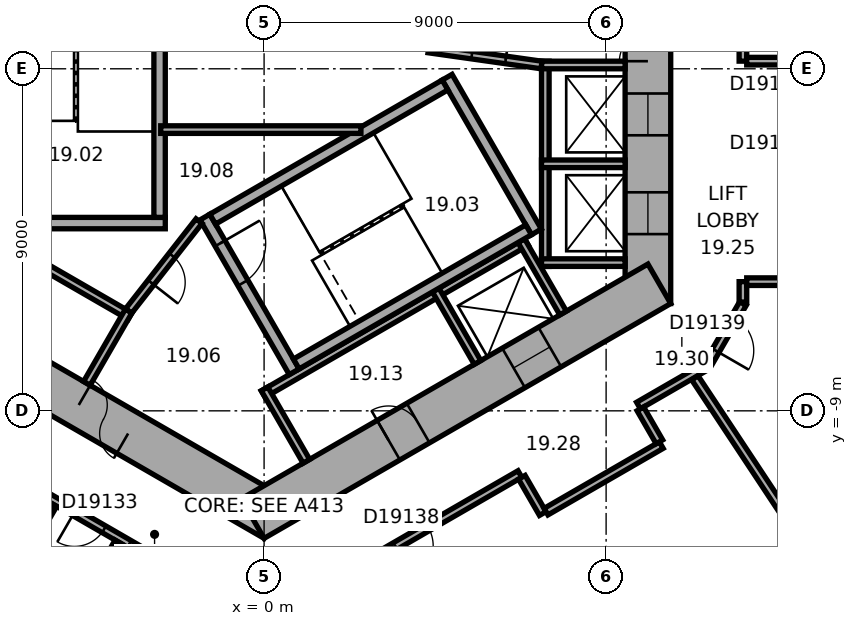
"""IFC4 building model, lengths in metres.
Left out: names, types, materials, properties, quantities, classifications, styles, units other than length and angle.
Written with IfcOpenShell. Run it as: python <this file> out.ifc"""

import sys

from ifc_helpers import new_model, si_unit, direction, frame, frame_2d, origin, place, context, subcontext, project, spatial, rectangle, extrude, element, fill, save


model = new_model("IFC4")
c1 = context("Model", 3, precision=1e-05, world=origin(), true_north=direction((0.0, 1.0)))
c2 = subcontext(c1, "Body", "Model", "MODEL_VIEW")
j1 = project(units=[si_unit("LENGTHUNIT", "METRE"), si_unit("PLANEANGLEUNIT", "RADIAN")], contexts=[c1])
p1 = place(None, origin())
s1 = spatial("IfcSite", under=j1, at=p1, CompositionType="ELEMENT")
p2 = place(p1, origin())
s2 = spatial("IfcBuilding", under=s1, at=p2, CompositionType="ELEMENT")
p3 = place(p2, frame((0.0, 0.0, 86.9)))
s3 = spatial("IfcBuildingStorey", under=s2, at=p3, CompositionType="ELEMENT", Elevation=86.9)
p4 = place(p3, frame((10.1, -6.177, 0.0), z_axis=(0.0, 0.0, 1.0), x_axis=(0.0, 1.0, 0.0)))
e1 = element("IfcWall", 1, at=p4, inside=s3, PredefinedType="SHEAR", context=c2, shape_type="SweptSolid", body=[
    extrude(rectangle(XDim=12.355, YDim=1.2, at=frame_2d((6.177, 0.0))), origin(), (0.0, 0.0, 1.0), 3.3),
])
p5 = place(p4, frame((6.378, 0.0, 0.0)))
e2 = element("IfcOpeningElement", 2, at=p5, cuts=e1, PredefinedType="OPENING", context=c2, shape_type="SweptSolid", body=[
    extrude(rectangle(XDim=1.5, YDim=2.1, at=frame_2d((0.75, 1.05))), frame((0.0, 0.61, 0.0), z_axis=(0.0, -1.0, 0.0), x_axis=(1.0, 0.0, 0.0)), (0.0, 0.0, 1.0), 1.22),
])
p6 = place(p4, frame((1.828, 0.0, 0.0)))
e3 = element("IfcOpeningElement", 3, at=p6, cuts=e1, PredefinedType="OPENING", context=c2, shape_type="SweptSolid", body=[
    extrude(rectangle(XDim=1.1, YDim=2.1, at=frame_2d((0.55, 1.05))), frame((0.0, 0.61, 0.0), z_axis=(0.0, -1.0, 0.0), x_axis=(1.0, 0.0, 0.0)), (0.0, 0.0, 1.0), 1.22),
])
p7 = place(p4, frame((4.427, 0.0, 0.0)))
e4 = element("IfcOpeningElement", 4, at=p7, cuts=e1, PredefinedType="OPENING", context=c2, shape_type="SweptSolid", body=[
    extrude(rectangle(XDim=1.1, YDim=2.1, at=frame_2d((0.55, 1.05))), frame((0.0, 0.61, 0.0), z_axis=(0.0, -1.0, 0.0), x_axis=(1.0, 0.0, 0.0)), (0.0, 0.0, 1.0), 1.22),
])
p8 = place(p3, frame((-10.4, -5.658, 0.0), z_axis=(0.0, 0.0, 1.0), x_axis=(0.866021384402, -0.500006961711, 0.0)))
e5 = element("IfcWall", 5, at=p8, inside=s3, PredefinedType="SHEAR", context=c2, shape_type="SweptSolid", body=[
    extrude(rectangle(XDim=12.355, YDim=1.2, at=frame_2d((6.178, 0.0))), origin(), (0.0, 0.0, 1.0), 3.3),
])
p9 = place(p8, frame((6.378, 0.0, 0.0)))
e6 = element("IfcOpeningElement", 6, at=p9, cuts=e5, PredefinedType="OPENING", context=c2, shape_type="SweptSolid", body=[
    extrude(rectangle(XDim=1.5, YDim=2.1, at=frame_2d((0.75, 1.05))), frame((0.0, 0.61, 0.0), z_axis=(0.0, -1.0, 0.0), x_axis=(1.0, 0.0, 0.0)), (0.0, 0.0, 1.0), 1.22),
])
p10 = place(p8, frame((3.228, 0.0, 0.0)))
e7 = element("IfcOpeningElement", 7, at=p10, cuts=e5, PredefinedType="OPENING", context=c2, shape_type="SweptSolid", body=[
    extrude(rectangle(XDim=0.9, YDim=2.1, at=frame_2d((0.45, 1.05))), frame((0.0, 0.61, 0.0), z_axis=(0.0, -1.0, 0.0), x_axis=(1.0, 0.0, 0.0)), (0.0, 0.0, 1.0), 1.22),
])
p11 = place(p3, frame((-0.3, -11.836, 0.0), z_axis=(0.0, 0.0, 1.0), x_axis=(0.866021384402, 0.500006961711, 0.0)))
e8 = element("IfcWall", 8, at=p11, inside=s3, PredefinedType="SHEAR", context=c2, shape_type="SweptSolid", body=[
    extrude(rectangle(XDim=12.355, YDim=1.2, at=frame_2d((6.178, 0.0))), origin(), (0.0, 0.0, 1.0), 3.3),
])
p12 = place(p11, frame((4.128, 0.0, 0.0)))
e9 = element("IfcOpeningElement", 9, at=p12, cuts=e8, PredefinedType="OPENING", context=c2, shape_type="SweptSolid", body=[
    extrude(rectangle(XDim=0.9, YDim=2.1, at=frame_2d((0.45, 1.05))), frame((0.0, 0.61, 0.0), z_axis=(0.0, -1.0, 0.0), x_axis=(1.0, 0.0, 0.0)), (0.0, 0.0, 1.0), 1.22),
])
p13 = place(p11, frame((7.928, 0.0, 0.0)))
e10 = element("IfcOpeningElement", 10, at=p13, cuts=e8, PredefinedType="OPENING", context=c2, shape_type="SweptSolid", body=[
    extrude(rectangle(XDim=1.1, YDim=2.1, at=frame_2d((0.55, 1.05))), frame((0.0, 0.61, 0.0), z_axis=(0.0, -1.0, 0.0), x_axis=(1.0, 0.0, 0.0)), (0.0, 0.0, 1.0), 1.22),
])
p14 = place(p3, frame((7.4, -5.2, 0.0), z_axis=(0.0, 0.0, 1.0), x_axis=(0.0, 1.0, 0.0)))
e11 = element("IfcWall", 11, at=p14, inside=s3, PredefinedType="PARTITIONING", context=c2, shape_type="SweptSolid", body=[
    extrude(rectangle(XDim=5.4, YDim=0.2, at=frame_2d((2.7, 0.0))), origin(), (0.0, 0.0, 1.0), 3.05),
])
for number, where, z_axis, x_axis in (
    (12, (7.3, -5.1, 0.0), (0.0, 0.0, 1.0), (1.0, 0.0, 0.0)),
    (13, (7.3, -2.5, 0.0), (0.0, 0.0, 1.0), (1.0, 0.0, 0.0)),
    (14, (7.3, 0.1, 0.0), (0.0, 0.0, 1.0), (1.0, 0.0, 0.0)),
):
    element("IfcWall", number, at=place(p3, frame(where, z_axis=z_axis, x_axis=x_axis)), inside=s3, PredefinedType="PARTITIONING", context=c2, shape_type="SweptSolid", body=[
        extrude(rectangle(XDim=2.2, YDim=0.2, at=frame_2d((1.1, 0.0))), origin(), (0.0, 0.0, 1.0), 3.05),
    ])
p15 = place(p3, frame((-8.203, -3.809, 0.0), z_axis=(0.0, 0.0, 1.0), x_axis=(0.866028230842, -0.499995103361, 0.0)))
e15 = element("IfcWall", 15, at=p15, inside=s3, PredefinedType="PARTITIONING", context=c2, shape_type="SweptSolid", body=[
    extrude(rectangle(XDim=5.4, YDim=0.2, at=frame_2d((2.7, 0.0))), origin(), (0.0, 0.0, 1.0), 3.05),
])
p16 = place(p3, frame((-3.563, -6.372, 0.0), z_axis=(0.0, 0.0, 1.0), x_axis=(-0.499994660107, -0.866028486751, 0.0)))
e16 = element("IfcWall", 16, at=p16, inside=s3, PredefinedType="PARTITIONING", context=c2, shape_type="SweptSolid", body=[
    extrude(rectangle(XDim=2.2, YDim=0.2, at=frame_2d((1.1, 0.0))), origin(), (0.0, 0.0, 1.0), 3.05),
])
p17 = place(p3, frame((-0.024, -8.559, 0.0), z_axis=(0.0, 0.0, 1.0), x_axis=(0.866026010844, 0.49999894854, 0.0)))
e17 = element("IfcWall", 17, at=p17, inside=s3, PredefinedType="PARTITIONING", context=c2, shape_type="SweptSolid", body=[
    extrude(rectangle(XDim=8.0, YDim=0.2, at=frame_2d((4.0, 0.0))), origin(), (0.0, 0.0, 1.0), 3.05),
])
for number, where, z_axis, x_axis in (
    (18, (0.013, -8.422, 0.0), (0.0, 0.0, 1.0), (0.5, -0.866, 0.0)),
    (19, (4.516, -5.822, 0.0), (0.0, 0.0, 1.0), (0.5, -0.866, 0.0)),
    (20, (6.768, -4.522, 0.0), (0.0, 0.0, 1.0), (0.5, -0.866, 0.0)),
):
    element("IfcWall", number, at=place(p3, frame(where, z_axis=z_axis, x_axis=x_axis)), inside=s3, PredefinedType="PARTITIONING", context=c2, shape_type="SweptSolid", body=[
        extrude(rectangle(XDim=2.2, YDim=0.2, at=frame_2d((1.1, 0.0))), origin(), (0.0, 0.0, 1.0), 3.05),
    ])
p18 = place(p3, frame((-2.6, -4.06, 0.0), z_axis=(0.0, 0.0, 1.0), x_axis=(-1.0, 0.0, 0.0)))
e21 = element("IfcWall", 21, at=p18, inside=s3, PredefinedType="SHEAR", context=c2, shape_type="SweptSolid", body=[
    extrude(rectangle(XDim=4.7, YDim=0.3, at=frame_2d((2.35, 0.0))), origin(), (0.0, 0.0, 1.0), 3.05),
])
p19 = place(p3, frame((-2.75, 3.15, 0.0), z_axis=(0.0, 0.0, 1.0), x_axis=(0.0, -1.0, 0.0)))
e22 = element("IfcWall", 22, at=p19, inside=s3, PredefinedType="SHEAR", context=c2, shape_type="SweptSolid", body=[
    extrude(rectangle(XDim=7.06, YDim=0.3, at=frame_2d((3.53, 0.0))), origin(), (0.0, 0.0, 1.0), 3.05),
])
p20 = place(p3, frame((-1.558, -3.902, 0.0), z_axis=(0.0, 0.0, 1.0), x_axis=(0.499977259774, -0.866038532462, 0.0)))
e23 = element("IfcWall", 23, at=p20, inside=s3, PredefinedType="SHEAR", context=c2, shape_type="SweptSolid", body=[
    extrude(rectangle(XDim=4.7, YDim=0.3, at=frame_2d((2.35, 0.0))), origin(), (0.0, 0.0, 1.0), 3.05),
])
p21 = place(p20, frame((0.8, 0.0, 0.0)))
e24 = element("IfcOpeningElement", 24, at=p21, cuts=e23, PredefinedType="OPENING", context=c2, shape_type="SweptSolid", body=[
    extrude(rectangle(XDim=1.2, YDim=2.1, at=frame_2d((0.6, 1.05))), frame((0.0, 0.16, 0.0), z_axis=(0.0, -1.0, 0.0), x_axis=(1.0, 0.0, 0.0)), (0.0, 0.0, 1.0), 0.32),
])
p22 = place(p3, frame((4.816, -0.222, 0.0), z_axis=(0.0, 0.0, 1.0), x_axis=(0.499977259774, -0.866038532462, 0.0)))
e25 = element("IfcWall", 25, at=p22, inside=s3, PredefinedType="SHEAR", context=c2, shape_type="SweptSolid", body=[
    extrude(rectangle(XDim=4.7, YDim=0.3, at=frame_2d((2.35, 0.0))), origin(), (0.0, 0.0, 1.0), 3.05),
])
for number, where, z_axis, x_axis in (
    (26, (-1.353, -3.957, 0.0), (0.0, 0.0, 1.0), (0.866, 0.5, 0.0)),
    (27, (0.847, -7.767, 0.0), (0.0, 0.0, 1.0), (0.866, 0.5, 0.0)),
):
    element("IfcWall", number, at=place(p3, frame(where, z_axis=z_axis, x_axis=x_axis)), inside=s3, PredefinedType="SHEAR", context=c2, shape_type="SweptSolid", body=[
        extrude(rectangle(XDim=7.06, YDim=0.3, at=frame_2d((3.53, 0.0))), origin(), (0.0, 0.0, 1.0), 3.05),
    ])
p23 = place(p3, frame((4.327, 0.521, 0.0), z_axis=(0.0, 0.0, 1.0), x_axis=(0.990124376366, -0.14019172346, 0.0)))
e28 = element("IfcWall", 28, at=p23, inside=s3, PredefinedType="PARTITIONING", context=c2, shape_type="SweptSolid", body=[
    extrude(rectangle(XDim=3.002, YDim=0.2, at=frame_2d((1.501, 0.0))), origin(), (0.0, 0.0, 1.0), 3.05),
])
p24 = place(p23, frame((1.15, 0.0, 0.0)))
e29 = element("IfcOpeningElement", 29, at=p24, cuts=e28, PredefinedType="OPENING", context=c2, shape_type="SweptSolid", body=[
    extrude(rectangle(XDim=0.9, YDim=2.1, at=frame_2d((0.45, 1.05))), frame((0.0, 0.11, 0.0), z_axis=(0.0, -1.0, 0.0), x_axis=(1.0, 0.0, 0.0)), (0.0, 0.0, 1.0), 0.22),
])
p25 = place(p3, frame((-1.712, -4.008, 0.0), z_axis=(0.0, 0.0, 1.0), x_axis=(-0.616549420702, -0.787316208287, 0.0)))
e30 = element("IfcWall", 30, at=p25, inside=s3, PredefinedType="PARTITIONING", context=c2, shape_type="SweptSolid", body=[
    extrude(rectangle(XDim=3.002, YDim=0.2, at=frame_2d((1.501, 0.0))), origin(), (0.0, 0.0, 1.0), 3.05),
])
p26 = place(p25, frame((1.15, 0.0, 0.0)))
e31 = element("IfcOpeningElement", 31, at=p26, cuts=e30, PredefinedType="OPENING", context=c2, shape_type="SweptSolid", body=[
    extrude(rectangle(XDim=0.9, YDim=2.1, at=frame_2d((0.45, 1.05))), frame((0.0, 0.11, 0.0), z_axis=(0.0, -1.0, 0.0), x_axis=(1.0, 0.0, 0.0)), (0.0, 0.0, 1.0), 0.22),
])
p27 = place(p3, frame((-2.72, -1.6, 0.0), z_axis=(0.0, 0.0, 1.0), x_axis=(1.0, 0.0, 0.0)))
e32 = element("IfcWall", 32, at=p27, inside=s3, PredefinedType="PARTITIONING", context=c2, shape_type="SweptSolid", body=[
    extrude(rectangle(XDim=5.269, YDim=0.2, at=frame_2d((2.634, 0.0))), origin(), (0.0, 0.0, 1.0), 3.05),
])
p28 = place(p3, frame((-11.615, -7.843, 0.0), z_axis=(0.0, 0.0, 1.0), x_axis=(0.866026466995, -0.499998158461, 0.0)))
e33 = element("IfcWall", 33, at=p28, inside=s3, PredefinedType="PARTITIONING", context=c2, shape_type="SweptSolid", body=[
    extrude(rectangle(XDim=12.315, YDim=0.2, at=frame_2d((6.158, 0.0))), origin(), (0.0, 0.0, 1.0), 3.05),
])
p29 = place(p28, frame((1.665, 0.0, 0.0)))
e34 = element("IfcOpeningElement", 34, at=p29, cuts=e33, PredefinedType="OPENING", context=c2, shape_type="SweptSolid", body=[
    extrude(rectangle(XDim=0.9, YDim=2.1, at=frame_2d((0.45, 1.05))), frame((0.0, 0.11, 0.0), z_axis=(0.0, -1.0, 0.0), x_axis=(1.0, 0.0, 0.0)), (0.0, 0.0, 1.0), 0.22),
])
p30 = place(p28, frame((7.65, 0.0, 0.0)))
e35 = element("IfcOpeningElement", 35, at=p30, cuts=e33, PredefinedType="OPENING", context=c2, shape_type="SweptSolid", body=[
    extrude(rectangle(XDim=0.9, YDim=2.1, at=frame_2d((0.45, 1.05))), frame((0.0, 0.11, 0.0), z_axis=(0.0, -1.0, 0.0), x_axis=(1.0, 0.0, 0.0)), (0.0, 0.0, 1.0), 0.22),
])
p31 = place(p28, frame((9.317, 0.0, 0.0)))
e36 = element("IfcOpeningElement", 36, at=p31, cuts=e33, PredefinedType="OPENING", context=c2, shape_type="SweptSolid", body=[
    extrude(rectangle(XDim=0.9, YDim=2.1, at=frame_2d((0.45, 1.05))), frame((0.0, 0.11, 0.0), z_axis=(0.0, -1.0, 0.0), x_axis=(1.0, 0.0, 0.0)), (0.0, 0.0, 1.0), 0.22),
])
p32 = place(p3, frame((-8.46, -20.461, 0.0), z_axis=(0.0, 0.0, 1.0), x_axis=(0.499999662836, 0.866025598446, 0.0)))
e37 = element("IfcWall", 37, at=p32, inside=s3, PredefinedType="PARTITIONING", context=c2, shape_type="SweptSolid", body=[
    extrude(rectangle(XDim=9.25, YDim=0.2, at=frame_2d((4.625, 0.0))), origin(), (0.0, 0.0, 1.0), 3.05),
])
p33 = place(p3, frame((-5.51, -11.483, 0.0), z_axis=(0.0, 0.0, 1.0), x_axis=(-0.500004234368, -0.866022959057, 0.0)))
e38 = element("IfcWall", 38, at=p33, inside=s3, PredefinedType="PARTITIONING", context=c2, shape_type="SweptSolid", body=[
    extrude(rectangle(XDim=2.5, YDim=0.12, at=frame_2d((1.25, 0.0))), origin(), (0.0, 0.0, 1.0), 3.05),
])
p34 = place(p33, frame((0.8, 0.0, 0.0)))
e39 = element("IfcOpeningElement", 39, at=p34, cuts=e38, PredefinedType="OPENING", context=c2, shape_type="SweptSolid", body=[
    extrude(rectangle(XDim=0.9, YDim=2.1, at=frame_2d((0.45, 1.05))), frame((0.0, 0.07, 0.0), z_axis=(0.0, -1.0, 0.0), x_axis=(1.0, 0.0, 0.0)), (0.0, 0.0, 1.0), 0.14),
])
p35 = place(p3, frame((1.033, -13.953, 0.0), z_axis=(0.0, 0.0, 1.0), x_axis=(0.866017531406, 0.500013635111, 0.0)))
e40 = element("IfcWall", 40, at=p35, inside=s3, PredefinedType="PARTITIONING", context=c2, shape_type="SweptSolid", body=[
    extrude(rectangle(XDim=6.58, YDim=0.2, at=frame_2d((3.29, 0.0))), origin(), (0.0, 0.0, 1.0), 3.05),
])
p36 = place(p35, frame((2.79, 0.0, 0.0)))
e41 = element("IfcOpeningElement", 41, at=p36, cuts=e40, PredefinedType="OPENING", context=c2, shape_type="SweptSolid", body=[
    extrude(rectangle(XDim=1.0, YDim=2.1, at=frame_2d((0.5, 1.05))), frame((0.0, 0.11, 0.0), z_axis=(0.0, -1.0, 0.0), x_axis=(1.0, 0.0, 0.0)), (0.0, 0.0, 1.0), 0.22),
])
p37 = place(p3, frame((6.782, -10.749, 0.0), z_axis=(0.0, 0.0, 1.0), x_axis=(0.500074377092, -0.865982457891, 0.0)))
e42 = element("IfcWall", 42, at=p37, inside=s3, PredefinedType="PARTITIONING", context=c2, shape_type="SweptSolid", body=[
    extrude(rectangle(XDim=1.101, YDim=0.2, at=frame_2d((0.55, 0.0))), origin(), (0.0, 0.0, 1.0), 3.05),
])
p38 = place(p3, frame((7.419, -11.653, 0.0), z_axis=(0.0, 0.0, 1.0), x_axis=(0.866038154057, 0.49997791523, 0.0)))
e43 = element("IfcWall", 43, at=p38, inside=s3, PredefinedType="PARTITIONING", context=c2, shape_type="SweptSolid", body=[
    extrude(rectangle(XDim=3.502, YDim=0.2, at=frame_2d((1.751, 0.0))), origin(), (0.0, 0.0, 1.0), 3.05),
])
p39 = place(p3, frame((9.852, -8.861, 0.0), z_axis=(0.0, 0.0, 1.0), x_axis=(0.866013291437, 0.500020978615, 0.0)))
e44 = element("IfcWall", 44, at=p39, inside=s3, PredefinedType="PARTITIONING", context=c2, shape_type="SweptSolid", body=[
    extrude(rectangle(XDim=2.077, YDim=0.2, at=frame_2d((1.038, 0.0))), origin(), (0.0, 0.0, 1.0), 3.05),
])
p40 = place(p3, frame((10.402, -9.815, 0.0), z_axis=(0.0, 0.0, 1.0), x_axis=(-0.499968756647, 0.866043441391, 0.0)))
e45 = element("IfcWall", 45, at=p40, inside=s3, PredefinedType="PARTITIONING", context=c2, shape_type="SweptSolid", body=[
    extrude(rectangle(XDim=1.001, YDim=0.2, at=frame_2d((0.5, 0.0))), origin(), (0.0, 0.0, 1.0), 3.05),
])
p41 = place(p3, frame((11.67, -7.788, 0.0), z_axis=(0.0, 0.0, 1.0), x_axis=(0.500063286585, 0.865988862174, 0.0)))
e46 = element("IfcWall", 46, at=p41, inside=s3, PredefinedType="PARTITIONING", context=c2, shape_type="SweptSolid", body=[
    extrude(rectangle(XDim=1.86, YDim=0.2, at=frame_2d((0.93, 0.0))), origin(), (0.0, 0.0, 1.0), 3.05),
])
p42 = place(p41, frame((0.43, 0.0, 0.0)))
e47 = element("IfcOpeningElement", 47, at=p42, cuts=e46, PredefinedType="OPENING", context=c2, shape_type="SweptSolid", body=[
    extrude(rectangle(XDim=1.0, YDim=2.1, at=frame_2d((0.5, 1.05))), frame((0.0, 0.11, 0.0), z_axis=(0.0, -1.0, 0.0), x_axis=(1.0, 0.0, 0.0)), (0.0, 0.0, 1.0), 0.22),
])
p43 = place(p3, frame((12.6, -6.138, 0.0), z_axis=(0.0, 0.0, 1.0), x_axis=(0.0, 1.0, 0.0)))
e48 = element("IfcWall", 48, at=p43, inside=s3, PredefinedType="PARTITIONING", context=c2, shape_type="SweptSolid", body=[
    extrude(rectangle(XDim=0.537, YDim=0.2, at=frame_2d((0.268, 0.0))), origin(), (0.0, 0.0, 1.0), 3.05),
])
p44 = place(p3, frame((12.6, 0.201, 0.0), z_axis=(0.0, 0.0, 1.0), x_axis=(0.0, 1.0, 0.0)))
e49 = element("IfcWall", 49, at=p44, inside=s3, PredefinedType="PARTITIONING", context=c2, shape_type="SweptSolid", body=[
    extrude(rectangle(XDim=2.604, YDim=0.2, at=frame_2d((1.302, 0.0))), origin(), (0.0, 0.0, 1.0), 3.05),
])
p45 = place(p3, frame((12.7, -5.601, 0.0), z_axis=(0.0, 0.0, 1.0), x_axis=(1.0, 0.0, 0.0)))
e50 = element("IfcWall", 50, at=p45, inside=s3, PredefinedType="PARTITIONING", context=c2, shape_type="SweptSolid", body=[
    extrude(rectangle(XDim=1.101, YDim=0.2, at=frame_2d((0.551, 0.0))), origin(), (0.0, 0.0, 1.0), 3.05),
])
p46 = place(p3, frame((13.701, 0.201, 0.0), z_axis=(0.0, 0.0, 1.0), x_axis=(-1.0, 0.0, 0.0)))
e51 = element("IfcWall", 51, at=p46, inside=s3, PredefinedType="PARTITIONING", context=c2, shape_type="SweptSolid", body=[
    extrude(rectangle(XDim=1.001, YDim=0.2, at=frame_2d((0.5, 0.0))), origin(), (0.0, 0.0, 1.0), 3.05),
])
p47 = place(p3, frame((16.255, -15.564, 0.0), z_axis=(0.0, 0.0, 1.0), x_axis=(-0.55192208744, 0.833895682562, 0.0)))
e52 = element("IfcWall", 52, at=p47, inside=s3, PredefinedType="PARTITIONING", context=c2, shape_type="SweptSolid", body=[
    extrude(rectangle(XDim=8.913, YDim=0.2, at=frame_2d((4.457, 0.0))), origin(), (0.0, 0.0, 1.0), 2.6),
])
p48 = place(p5, origin())
e53 = element("IfcDoor", 53, at=p48, inside=s3, OperationType="DOUBLE_DOOR_SINGLE_SWING", PredefinedType="DOOR", context=c2, shape_type="SweptSolid", body=[
    extrude(rectangle(XDim=1.5, YDim=2.1, at=frame_2d((0.75, 1.05))), frame((0.0, 0.025, 0.0), z_axis=(0.0, -1.0, 0.0), x_axis=(1.0, 0.0, 0.0)), (0.0, 0.0, 1.0), 0.05),
])
fill(e2, e53)
p49 = place(p9, origin())
e54 = element("IfcDoor", 54, at=p49, inside=s3, OperationType="DOUBLE_DOOR_SINGLE_SWING", PredefinedType="DOOR", context=c2, shape_type="SweptSolid", body=[
    extrude(rectangle(XDim=1.5, YDim=2.1, at=frame_2d((0.75, 1.05))), frame((0.0, 0.025, 0.0), z_axis=(0.0, -1.0, 0.0), x_axis=(1.0, 0.0, 0.0)), (0.0, 0.0, 1.0), 0.05),
])
fill(e6, e54)
p50 = place(p21, origin())
e55 = element("IfcDoor", 55, at=p50, inside=s3, OperationType="SINGLE_SWING_RIGHT", PredefinedType="DOOR", context=c2, shape_type="SweptSolid", body=[
    extrude(rectangle(XDim=1.2, YDim=2.1, at=frame_2d((0.6, 1.05))), frame((0.0, 0.025, 0.0), z_axis=(0.0, -1.0, 0.0), x_axis=(1.0, 0.0, 0.0)), (0.0, 0.0, 1.0), 0.05),
])
fill(e24, e55)
p51 = place(p24, origin())
e56 = element("IfcDoor", 56, at=p51, inside=s3, OperationType="SINGLE_SWING_LEFT", PredefinedType="DOOR", context=c2, shape_type="SweptSolid", body=[
    extrude(rectangle(XDim=0.9, YDim=2.1, at=frame_2d((0.45, 1.05))), frame((0.0, 0.025, 0.0), z_axis=(0.0, -1.0, 0.0), x_axis=(1.0, 0.0, 0.0)), (0.0, 0.0, 1.0), 0.05),
])
fill(e29, e56)
p52 = place(p26, origin())
e57 = element("IfcDoor", 57, at=p52, inside=s3, OperationType="SINGLE_SWING_LEFT", PredefinedType="DOOR", context=c2, shape_type="SweptSolid", body=[
    extrude(rectangle(XDim=0.9, YDim=2.1, at=frame_2d((0.45, 1.05))), frame((0.0, 0.025, 0.0), z_axis=(0.0, -1.0, 0.0), x_axis=(1.0, 0.0, 0.0)), (0.0, 0.0, 1.0), 0.05),
])
fill(e31, e57)
p53 = place(p12, origin())
e58 = element("IfcDoor", 58, at=p53, inside=s3, OperationType="SINGLE_SWING_LEFT", PredefinedType="DOOR", context=c2, shape_type="SweptSolid", body=[
    extrude(rectangle(XDim=0.9, YDim=2.1, at=frame_2d((0.45, 1.05))), frame((0.0, 0.025, 0.0), z_axis=(0.0, -1.0, 0.0), x_axis=(1.0, 0.0, 0.0)), (0.0, 0.0, 1.0), 0.05),
])
fill(e9, e58)
p54 = place(p6, origin())
e59 = element("IfcDoor", 59, at=p54, inside=s3, OperationType="DOUBLE_DOOR_SLIDING", PredefinedType="DOOR", context=c2, shape_type="SweptSolid", body=[
    extrude(rectangle(XDim=1.1, YDim=2.1, at=frame_2d((0.55, 1.05))), frame((0.0, 0.025, 0.0), z_axis=(0.0, -1.0, 0.0), x_axis=(1.0, 0.0, 0.0)), (0.0, 0.0, 1.0), 0.05),
])
fill(e3, e59)
p55 = place(p7, origin())
e60 = element("IfcDoor", 60, at=p55, inside=s3, OperationType="DOUBLE_DOOR_SLIDING", PredefinedType="DOOR", context=c2, shape_type="SweptSolid", body=[
    extrude(rectangle(XDim=1.1, YDim=2.1, at=frame_2d((0.55, 1.05))), frame((0.0, 0.025, 0.0), z_axis=(0.0, -1.0, 0.0), x_axis=(1.0, 0.0, 0.0)), (0.0, 0.0, 1.0), 0.05),
])
fill(e4, e60)
p56 = place(p13, origin())
e61 = element("IfcDoor", 61, at=p56, inside=s3, OperationType="DOUBLE_DOOR_SLIDING", PredefinedType="DOOR", context=c2, shape_type="SweptSolid", body=[
    extrude(rectangle(XDim=1.1, YDim=2.1, at=frame_2d((0.55, 1.05))), frame((0.0, 0.025, 0.0), z_axis=(0.0, -1.0, 0.0), x_axis=(1.0, 0.0, 0.0)), (0.0, 0.0, 1.0), 0.05),
])
fill(e10, e61)
p57 = place(p30, origin())
e62 = element("IfcDoor", 62, at=p57, inside=s3, OperationType="SINGLE_SWING_LEFT", PredefinedType="DOOR", context=c2, shape_type="SweptSolid", body=[
    extrude(rectangle(XDim=0.9, YDim=2.1, at=frame_2d((0.45, 1.05))), frame((0.0, 0.025, 0.0), z_axis=(0.0, -1.0, 0.0), x_axis=(1.0, 0.0, 0.0)), (0.0, 0.0, 1.0), 0.05),
])
fill(e35, e62)
p58 = place(p31, origin())
e63 = element("IfcDoor", 63, at=p58, inside=s3, OperationType="SINGLE_SWING_LEFT", PredefinedType="DOOR", context=c2, shape_type="SweptSolid", body=[
    extrude(rectangle(XDim=0.9, YDim=2.1, at=frame_2d((0.45, 1.05))), frame((0.0, 0.025, 0.0), z_axis=(0.0, -1.0, 0.0), x_axis=(1.0, 0.0, 0.0)), (0.0, 0.0, 1.0), 0.05),
])
fill(e36, e63)
p59 = place(p36, origin())
e64 = element("IfcDoor", 64, at=p59, inside=s3, OperationType="SINGLE_SWING_LEFT", PredefinedType="DOOR", context=c2, shape_type="SweptSolid", body=[
    extrude(rectangle(XDim=1.0, YDim=2.1, at=frame_2d((0.5, 1.05))), frame((0.0, 0.025, 0.0), z_axis=(0.0, -1.0, 0.0), x_axis=(1.0, 0.0, 0.0)), (0.0, 0.0, 1.0), 0.05),
])
fill(e41, e64)
p60 = place(p42, origin())
e65 = element("IfcDoor", 65, at=p60, inside=s3, OperationType="SINGLE_SWING_LEFT", PredefinedType="DOOR", context=c2, shape_type="SweptSolid", body=[
    extrude(rectangle(XDim=1.0, YDim=2.1, at=frame_2d((0.5, 1.05))), frame((0.0, 0.025, 0.0), z_axis=(0.0, -1.0, 0.0), x_axis=(1.0, 0.0, 0.0)), (0.0, 0.0, 1.0), 0.05),
])
fill(e47, e65)
save(model, sys.argv[1])
